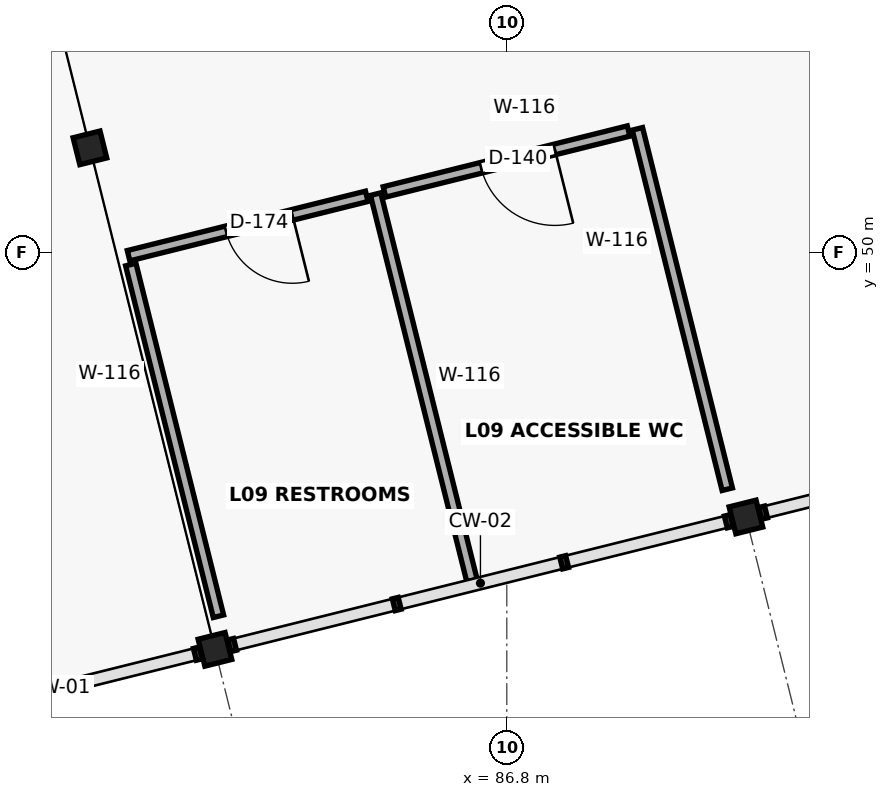
"""IFC4 building model, lengths in metres.
Left out: names, types, materials, properties, quantities, classifications, styles, units other than length and angle.
Written with IfcOpenShell. Run it as: python <this file> out.ifc"""

import sys

from ifc_helpers import new_model, si_unit, direction, frame, frame_2d, origin, origin_2d, place, context, subcontext, project, spatial, rectangle, extrude, element, fill, save


model = new_model("IFC4")
c1 = context("Model", 3, precision=1e-05, world=origin(), true_north=direction((0.0, 1.0)))
c2 = subcontext(c1, "Body", "Model", "MODEL_VIEW")
j1 = project(units=[si_unit("LENGTHUNIT", "METRE"), si_unit("PLANEANGLEUNIT", "RADIAN")], contexts=[c1])
p1 = place(None, origin())
s1 = spatial("IfcSite", under=j1, at=p1, CompositionType="ELEMENT")
p2 = place(p1, origin())
s2 = spatial("IfcBuilding", under=s1, at=p2, CompositionType="ELEMENT")
p3 = place(p2, frame((0.0, 0.0, 37.8)))
s3 = spatial("IfcBuildingStorey", under=s2, at=p3, CompositionType="ELEMENT", Elevation=37.8)
for number, where, z_axis, x_axis in (
    (1, (82.96, 44.781, 0.0), (0.0, 0.0, 1.0), (0.97, 0.242, 0.0)),
    (2, (81.315, 51.378, 0.0), (0.0, 0.0, 1.0), (0.97, 0.242, 0.0)),
    (3, (89.947, 46.522, 0.0), (0.0, 0.0, 1.0), (0.97, 0.242, 0.0)),
):
    element("IfcColumn", number, at=place(p3, frame(where, z_axis=z_axis, x_axis=x_axis)), inside=s3, PredefinedType="COLUMN", context=c2, shape_type="SweptSolid", body=[
        extrude(rectangle(XDim=0.365, YDim=0.365, at=origin_2d()), origin(), (0.0, 0.0, 1.0), 3.9),
    ])
p4 = place(p3, frame((86.342, 45.685, 0.0), z_axis=(0.0, 0.0, 1.0), x_axis=(-0.24189974474, 0.970301248837, 0.0)))
e4 = element("IfcWall", 4, at=p4, inside=s3, PredefinedType="PLUMBINGWALL", context=c2, shape_type="SweptSolid", body=[
    extrude(rectangle(XDim=5.24, YDim=0.14, at=frame_2d((2.62, 0.0))), origin(), (0.0, 0.0, 1.0), 3.72),
])
p5 = place(p3, frame((84.958, 50.741, 0.0), z_axis=(0.0, 0.0, 1.0), x_axis=(-0.970289047109, -0.241948682698, 0.0)))
e5 = element("IfcWall", 5, at=p5, inside=s3, PredefinedType="PLUMBINGWALL", context=c2, shape_type="SweptSolid", body=[
    extrude(rectangle(XDim=3.23, YDim=0.14, at=frame_2d((1.615, 0.0))), origin(), (0.0, 0.0, 1.0), 3.72),
])
p6 = place(p5, frame((1.009, 0.0, 0.0)))
e6 = element("IfcOpeningElement", 6, at=p6, cuts=e5, PredefinedType="OPENING", context=c2, shape_type="SweptSolid", body=[
    extrude(rectangle(XDim=0.9, YDim=2.15, at=frame_2d((0.45, 1.075))), frame((0.0, 0.082, 0.0), z_axis=(0.0, -1.0, 0.0), x_axis=(1.0, 0.0, 0.0)), (0.0, 0.0, 1.0), 0.164),
])
p7 = place(p3, frame((81.853, 49.843, 0.0), z_axis=(0.0, 0.0, 1.0), x_axis=(0.241909155499, -0.970298902651, 0.0)))
e7 = element("IfcWall", 7, at=p7, inside=s3, PredefinedType="PLUMBINGWALL", context=c2, shape_type="SweptSolid", body=[
    extrude(rectangle(XDim=4.769, YDim=0.14, at=frame_2d((2.384, 0.0))), origin(), (0.0, 0.0, 1.0), 3.035),
])
p8 = place(p3, frame((89.701, 46.887, 0.0), z_axis=(0.0, 0.0, 1.0), x_axis=(-0.241912528441, 0.970298061723, 0.0)))
e8 = element("IfcWall", 8, at=p8, inside=s3, PredefinedType="PLUMBINGWALL", context=c2, shape_type="SweptSolid", body=[
    extrude(rectangle(XDim=4.886, YDim=0.14, at=frame_2d((2.443, 0.0))), origin(), (0.0, 0.0, 1.0), 3.035),
])
p9 = place(p3, frame((88.402, 51.6, 0.0), z_axis=(0.0, 0.0, 1.0), x_axis=(-0.970294165893, -0.241928153868, 0.0)))
e9 = element("IfcWall", 9, at=p9, inside=s3, PredefinedType="PLUMBINGWALL", context=c2, shape_type="SweptSolid", body=[
    extrude(rectangle(XDim=3.31, YDim=0.14, at=frame_2d((1.655, 0.0))), origin(), (0.0, 0.0, 1.0), 3.72),
])
p10 = place(p9, frame((1.0, 0.0, 0.0)))
e10 = element("IfcOpeningElement", 10, at=p10, cuts=e9, PredefinedType="OPENING", context=c2, shape_type="SweptSolid", body=[
    extrude(rectangle(XDim=1.0, YDim=2.15, at=frame_2d((0.5, 1.075))), frame((0.0, 0.082, 0.0), z_axis=(0.0, -1.0, 0.0), x_axis=(1.0, 0.0, 0.0)), (0.0, 0.0, 1.0), 0.164),
])
p11 = place(p6, origin())
e11 = element("IfcDoor", 11, at=p11, inside=s3, OperationType="SINGLE_SWING_LEFT", PredefinedType="DOOR", context=c2, shape_type="SweptSolid", body=[
    extrude(rectangle(XDim=0.9, YDim=2.15, at=frame_2d((0.45, 1.075))), frame((0.0, 0.025, 0.0), z_axis=(0.0, -1.0, 0.0), x_axis=(1.0, 0.0, 0.0)), (0.0, 0.0, 1.0), 0.05),
])
fill(e6, e11)
p12 = place(p10, origin())
e12 = element("IfcDoor", 12, at=p12, inside=s3, OperationType="SINGLE_SWING_LEFT", PredefinedType="DOOR", context=c2, shape_type="SweptSolid", body=[
    extrude(rectangle(XDim=1.0, YDim=2.15, at=frame_2d((0.5, 1.075))), frame((0.0, 0.025, 0.0), z_axis=(0.0, -1.0, 0.0), x_axis=(1.0, 0.0, 0.0)), (0.0, 0.0, 1.0), 0.05),
])
fill(e10, e12)
save(model, sys.argv[1])
